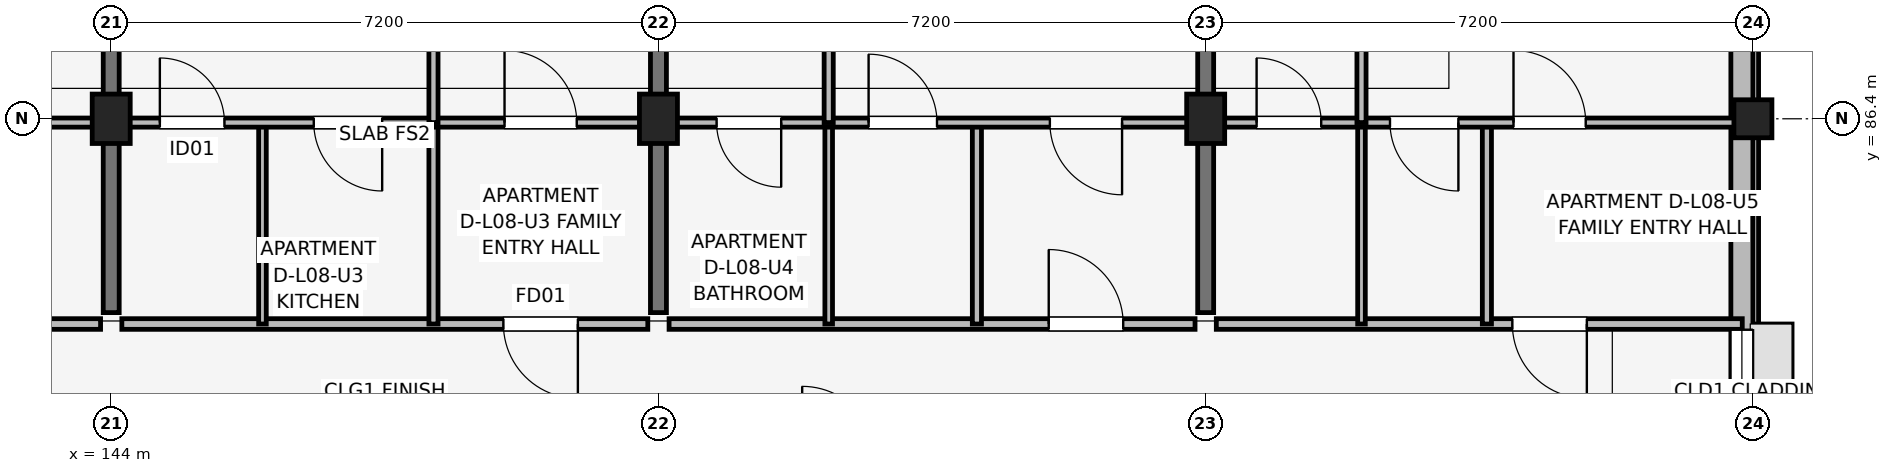
"""IFC4 building model, lengths in metres.
Left out: names, types, materials, properties, quantities, classifications, styles, units other than length and angle.
Written with IfcOpenShell. Run it as: python <this file> out.ifc"""

import sys

from ifc_helpers import new_model, si_unit, direction, frame, frame_2d, origin, origin_2d, place, context, subcontext, project, spatial, rectangle, extrude, element, fill, save


model = new_model("IFC4")
c1 = context("Model", 3, precision=1e-05, world=origin(), true_north=direction((0.0, 1.0)))
c2 = subcontext(c1, "Body", "Model", "MODEL_VIEW")
j1 = project(units=[si_unit("LENGTHUNIT", "METRE"), si_unit("PLANEANGLEUNIT", "RADIAN")], contexts=[c1])
p1 = place(None, origin())
s1 = spatial("IfcSite", under=j1, at=p1, CompositionType="ELEMENT")
p2 = place(p1, origin())
s2 = spatial("IfcBuilding", under=s1, at=p2, CompositionType="ELEMENT")
p3 = place(p2, frame((0.0, 0.0, 27.6)))
s3 = spatial("IfcBuildingStorey", under=s2, at=p3, CompositionType="ELEMENT", Elevation=27.6)
for number, where, z_axis, x_axis in (
    (1, (144.0, 86.4, 0.0), (0.0, 0.0, 1.0), (1.0, 0.0, 0.0)),
    (2, (151.2, 86.4, 0.0), (0.0, 0.0, 1.0), (1.0, 0.0, 0.0)),
    (3, (158.4, 86.4, 0.0), (0.0, 0.0, 1.0), (1.0, 0.0, 0.0)),
):
    element("IfcColumn", number, at=place(p3, frame(where, z_axis=z_axis, x_axis=x_axis)), inside=s3, PredefinedType="COLUMN", context=c2, shape_type="SweptSolid", body=[
        extrude(rectangle(XDim=0.5, YDim=0.65, at=origin_2d()), origin(), (0.0, 0.0, 1.0), 3.15),
    ])
p4 = place(p3, frame((165.6, 86.4, 0.0), z_axis=(0.0, 0.0, 1.0), x_axis=(1.0, 0.0, 0.0)))
e4 = element("IfcColumn", 4, at=p4, inside=s3, PredefinedType="COLUMN", context=c2, shape_type="SweptSolid", body=[
    extrude(rectangle(XDim=0.5, YDim=0.5, at=origin_2d()), origin(), (0.0, 0.0, 1.0), 3.15),
])
for number, where, z_axis, x_axis in (
    (5, (144.0, 83.85, 0.0), (0.0, 0.0, 1.0), (0.0, 1.0, 0.0)),
    (6, (151.2, 83.85, 0.0), (0.0, 0.0, 1.0), (0.0, 1.0, 0.0)),
    (7, (158.4, 83.85, 0.0), (0.0, 0.0, 1.0), (0.0, 1.0, 0.0)),
):
    element("IfcWall", number, at=place(p3, frame(where, z_axis=z_axis, x_axis=x_axis)), inside=s3, PredefinedType="SHEAR", context=c2, shape_type="SweptSolid", body=[
        extrude(rectangle(XDim=9.4, YDim=0.21, at=frame_2d((4.7, 0.0))), origin(), (0.0, 0.0, 1.0), 3.15),
    ])
p5 = place(p3, frame((165.455, 74.8, 0.0), z_axis=(0.0, 0.0, 1.0), x_axis=(0.0, 1.0, 0.0)))
e8 = element("IfcWall", 8, at=p5, inside=s3, PredefinedType="SOLIDWALL", context=c2, shape_type="SweptSolid", body=[
    extrude(rectangle(XDim=16.0, YDim=0.29, at=frame_2d((8.0, 0.0))), origin(), (0.0, 0.0, 1.0), 2.43),
])
p6 = place(p5, frame((7.175, 0.0, 1.05)))
e9 = element("IfcOpeningElement", 9, at=p6, cuts=e8, PredefinedType="OPENING", context=c2, shape_type="SweptSolid", body=[
    extrude(rectangle(XDim=1.65, YDim=1.15, at=frame_2d((0.825, 0.575))), frame((0.0, 0.155, 0.0), z_axis=(0.0, -1.0, 0.0), x_axis=(1.0, 0.0, 0.0)), (0.0, 0.0, 1.0), 0.31),
])
p7 = place(p5, frame((13.13, 0.0, 0.72)))
e10 = element("IfcOpeningElement", 10, at=p7, cuts=e8, PredefinedType="OPENING", context=c2, shape_type="SweptSolid", body=[
    extrude(rectangle(XDim=1.42, YDim=1.6, at=frame_2d((0.71, 0.8))), frame((0.0, 0.155, 0.0), z_axis=(0.0, -1.0, 0.0), x_axis=(1.0, 0.0, 0.0)), (0.0, 0.0, 1.0), 0.31),
])
p8 = place(p3, frame((136.94, 83.7, 0.0), z_axis=(0.0, 0.0, 1.0), x_axis=(1.0, 0.0, 0.0)))
e11 = element("IfcWall", 11, at=p8, inside=s3, PredefinedType="PARTITIONING", context=c2, shape_type="SweptSolid", body=[
    extrude(rectangle(XDim=6.92, YDim=0.14, at=frame_2d((3.46, 0.0))), origin(), (0.0, 0.0, 1.0), 2.38),
])
p9 = place(p8, frame((4.87, 0.0, 0.0)))
e12 = element("IfcOpeningElement", 12, at=p9, cuts=e11, PredefinedType="OPENING", context=c2, shape_type="SweptSolid", body=[
    extrude(rectangle(XDim=0.98, YDim=2.1, at=frame_2d((0.49, 1.05))), frame((0.0, 0.08, 0.0), z_axis=(0.0, -1.0, 0.0), x_axis=(1.0, 0.0, 0.0)), (0.0, 0.0, 1.0), 0.16),
])
p10 = place(p3, frame((136.94, 86.35, 0.0), z_axis=(0.0, 0.0, 1.0), x_axis=(1.0, 0.0, 0.0)))
e13 = element("IfcWall", 13, at=p10, inside=s3, PredefinedType="PARTITIONING", context=c2, shape_type="SweptSolid", body=[
    extrude(rectangle(XDim=6.92, YDim=0.12, at=frame_2d((3.46, 0.0))), origin(), (0.0, 0.0, 1.0), 2.38),
])
p11 = place(p10, frame((1.35, 0.0, 0.0), z_axis=(0.0, 0.0, 1.0), x_axis=(-1.0, 0.0, 0.0)))
e14 = element("IfcOpeningElement", 14, at=p11, cuts=e13, PredefinedType="OPENING", context=c2, shape_type="SweptSolid", body=[
    extrude(rectangle(XDim=0.85, YDim=2.08, at=frame_2d((0.425, 1.04))), frame((0.0, 0.07, 0.0), z_axis=(0.0, -1.0, 0.0), x_axis=(1.0, 0.0, 0.0)), (0.0, 0.0, 1.0), 0.14),
])
p12 = place(p10, frame((2.375, 0.0, 0.0)))
e15 = element("IfcOpeningElement", 15, at=p12, cuts=e13, PredefinedType="OPENING", context=c2, shape_type="SweptSolid", body=[
    extrude(rectangle(XDim=0.9, YDim=2.08, at=frame_2d((0.45, 1.04))), frame((0.0, 0.07, 0.0), z_axis=(0.0, -1.0, 0.0), x_axis=(1.0, 0.0, 0.0)), (0.0, 0.0, 1.0), 0.14),
])
p13 = place(p10, frame((5.835, 0.0, 0.0), z_axis=(0.0, 0.0, 1.0), x_axis=(-1.0, 0.0, 0.0)))
e16 = element("IfcOpeningElement", 16, at=p13, cuts=e13, PredefinedType="OPENING", context=c2, shape_type="SweptSolid", body=[
    extrude(rectangle(XDim=0.95, YDim=2.08, at=frame_2d((0.475, 1.04))), frame((0.0, 0.07, 0.0), z_axis=(0.0, -1.0, 0.0), x_axis=(1.0, 0.0, 0.0)), (0.0, 0.0, 1.0), 0.14),
])
p14 = place(p3, frame((144.14, 83.7, 0.0), z_axis=(0.0, 0.0, 1.0), x_axis=(1.0, 0.0, 0.0)))
e17 = element("IfcWall", 17, at=p14, inside=s3, PredefinedType="PARTITIONING", context=c2, shape_type="SweptSolid", body=[
    extrude(rectangle(XDim=6.92, YDim=0.14, at=frame_2d((3.46, 0.0))), origin(), (0.0, 0.0, 1.0), 2.38),
])
p15 = place(p14, frame((6.0, 0.0, 0.0), z_axis=(0.0, 0.0, 1.0), x_axis=(-1.0, 0.0, 0.0)))
e18 = element("IfcOpeningElement", 18, at=p15, cuts=e17, PredefinedType="OPENING", context=c2, shape_type="SweptSolid", body=[
    extrude(rectangle(XDim=0.98, YDim=2.1, at=frame_2d((0.49, 1.05))), frame((0.0, 0.08, 0.0), z_axis=(0.0, -1.0, 0.0), x_axis=(1.0, 0.0, 0.0)), (0.0, 0.0, 1.0), 0.16),
])
p16 = place(p3, frame((145.99, 83.7, 0.0), z_axis=(0.0, 0.0, 1.0), x_axis=(0.0, 1.0, 0.0)))
e19 = element("IfcWall", 19, at=p16, inside=s3, PredefinedType="PARTITIONING", context=c2, shape_type="SweptSolid", body=[
    extrude(rectangle(XDim=2.65, YDim=0.1, at=frame_2d((1.325, 0.0))), origin(), (0.0, 0.0, 1.0), 2.38),
])
p17 = place(p3, frame((148.24, 83.7, 0.0), z_axis=(0.0, 0.0, 1.0), x_axis=(0.0, 1.0, 0.0)))
e20 = element("IfcWall", 20, at=p17, inside=s3, PredefinedType="PARTITIONING", context=c2, shape_type="SweptSolid", body=[
    extrude(rectangle(XDim=2.65, YDim=0.12, at=frame_2d((1.325, 0.0))), origin(), (0.0, 0.0, 1.0), 2.38),
])
p18 = place(p3, frame((144.14, 86.35, 0.0), z_axis=(0.0, 0.0, 1.0), x_axis=(1.0, 0.0, 0.0)))
e21 = element("IfcWall", 21, at=p18, inside=s3, PredefinedType="PARTITIONING", context=c2, shape_type="SweptSolid", body=[
    extrude(rectangle(XDim=6.92, YDim=0.12, at=frame_2d((3.46, 0.0))), origin(), (0.0, 0.0, 1.0), 2.38),
])
p19 = place(p18, frame((0.5, 0.0, 0.0)))
e22 = element("IfcOpeningElement", 22, at=p19, cuts=e21, PredefinedType="OPENING", context=c2, shape_type="SweptSolid", body=[
    extrude(rectangle(XDim=0.85, YDim=2.08, at=frame_2d((0.425, 1.04))), frame((0.0, 0.07, 0.0), z_axis=(0.0, -1.0, 0.0), x_axis=(1.0, 0.0, 0.0)), (0.0, 0.0, 1.0), 0.14),
])
p20 = place(p18, frame((3.425, 0.0, 0.0), z_axis=(0.0, 0.0, 1.0), x_axis=(-1.0, 0.0, 0.0)))
e23 = element("IfcOpeningElement", 23, at=p20, cuts=e21, PredefinedType="OPENING", context=c2, shape_type="SweptSolid", body=[
    extrude(rectangle(XDim=0.9, YDim=2.08, at=frame_2d((0.45, 1.04))), frame((0.0, 0.07, 0.0), z_axis=(0.0, -1.0, 0.0), x_axis=(1.0, 0.0, 0.0)), (0.0, 0.0, 1.0), 0.14),
])
p21 = place(p18, frame((5.035, 0.0, 0.0)))
e24 = element("IfcOpeningElement", 24, at=p21, cuts=e21, PredefinedType="OPENING", context=c2, shape_type="SweptSolid", body=[
    extrude(rectangle(XDim=0.95, YDim=2.08, at=frame_2d((0.475, 1.04))), frame((0.0, 0.07, 0.0), z_axis=(0.0, -1.0, 0.0), x_axis=(1.0, 0.0, 0.0)), (0.0, 0.0, 1.0), 0.14),
])
p22 = place(p3, frame((148.24, 86.35, 0.0), z_axis=(0.0, 0.0, 1.0), x_axis=(0.0, 1.0, 0.0)))
e25 = element("IfcWall", 25, at=p22, inside=s3, PredefinedType="PARTITIONING", context=c2, shape_type="SweptSolid", body=[
    extrude(rectangle(XDim=6.95, YDim=0.12, at=frame_2d((3.475, 0.0))), origin(), (0.0, 0.0, 1.0), 2.38),
])
p23 = place(p22, frame((3.925, 0.0, 0.0), z_axis=(0.0, 0.0, 1.0), x_axis=(-1.0, 0.0, 0.0)))
e26 = element("IfcOpeningElement", 26, at=p23, cuts=e25, PredefinedType="OPENING", context=c2, shape_type="SweptSolid", body=[
    extrude(rectangle(XDim=0.9, YDim=2.08, at=frame_2d((0.45, 1.04))), frame((0.0, 0.07, 0.0), z_axis=(0.0, -1.0, 0.0), x_axis=(1.0, 0.0, 0.0)), (0.0, 0.0, 1.0), 0.14),
])
p24 = place(p3, frame((151.34, 83.7, 0.0), z_axis=(0.0, 0.0, 1.0), x_axis=(1.0, 0.0, 0.0)))
e27 = element("IfcWall", 27, at=p24, inside=s3, PredefinedType="PARTITIONING", context=c2, shape_type="SweptSolid", body=[
    extrude(rectangle(XDim=6.92, YDim=0.14, at=frame_2d((3.46, 0.0))), origin(), (0.0, 0.0, 1.0), 2.38),
])
p25 = place(p24, frame((4.995, 0.0, 0.0)))
e28 = element("IfcOpeningElement", 28, at=p25, cuts=e27, PredefinedType="OPENING", context=c2, shape_type="SweptSolid", body=[
    extrude(rectangle(XDim=0.98, YDim=2.1, at=frame_2d((0.49, 1.05))), frame((0.0, 0.08, 0.0), z_axis=(0.0, -1.0, 0.0), x_axis=(1.0, 0.0, 0.0)), (0.0, 0.0, 1.0), 0.16),
])
p26 = place(p3, frame((153.44, 83.7, 0.0), z_axis=(0.0, 0.0, 1.0), x_axis=(0.0, 1.0, 0.0)))
e29 = element("IfcWall", 29, at=p26, inside=s3, PredefinedType="PARTITIONING", context=c2, shape_type="SweptSolid", body=[
    extrude(rectangle(XDim=2.65, YDim=0.1, at=frame_2d((1.325, 0.0))), origin(), (0.0, 0.0, 1.0), 2.38),
])
p27 = place(p3, frame((155.39, 83.7, 0.0), z_axis=(0.0, 0.0, 1.0), x_axis=(0.0, 1.0, 0.0)))
e30 = element("IfcWall", 30, at=p27, inside=s3, PredefinedType="PARTITIONING", context=c2, shape_type="SweptSolid", body=[
    extrude(rectangle(XDim=2.65, YDim=0.12, at=frame_2d((1.325, 0.0))), origin(), (0.0, 0.0, 1.0), 2.38),
])
p28 = place(p3, frame((151.34, 86.35, 0.0), z_axis=(0.0, 0.0, 1.0), x_axis=(1.0, 0.0, 0.0)))
e31 = element("IfcWall", 31, at=p28, inside=s3, PredefinedType="PARTITIONING", context=c2, shape_type="SweptSolid", body=[
    extrude(rectangle(XDim=6.92, YDim=0.12, at=frame_2d((3.46, 0.0))), origin(), (0.0, 0.0, 1.0), 2.38),
])
p29 = place(p28, frame((1.475, 0.0, 0.0), z_axis=(0.0, 0.0, 1.0), x_axis=(-1.0, 0.0, 0.0)))
e32 = element("IfcOpeningElement", 32, at=p29, cuts=e31, PredefinedType="OPENING", context=c2, shape_type="SweptSolid", body=[
    extrude(rectangle(XDim=0.85, YDim=2.08, at=frame_2d((0.425, 1.04))), frame((0.0, 0.07, 0.0), z_axis=(0.0, -1.0, 0.0), x_axis=(1.0, 0.0, 0.0)), (0.0, 0.0, 1.0), 0.14),
])
p30 = place(p28, frame((2.625, 0.0, 0.0)))
e33 = element("IfcOpeningElement", 33, at=p30, cuts=e31, PredefinedType="OPENING", context=c2, shape_type="SweptSolid", body=[
    extrude(rectangle(XDim=0.9, YDim=2.08, at=frame_2d((0.45, 1.04))), frame((0.0, 0.07, 0.0), z_axis=(0.0, -1.0, 0.0), x_axis=(1.0, 0.0, 0.0)), (0.0, 0.0, 1.0), 0.14),
])
p31 = place(p28, frame((5.96, 0.0, 0.0), z_axis=(0.0, 0.0, 1.0), x_axis=(-1.0, 0.0, 0.0)))
e34 = element("IfcOpeningElement", 34, at=p31, cuts=e31, PredefinedType="OPENING", context=c2, shape_type="SweptSolid", body=[
    extrude(rectangle(XDim=0.95, YDim=2.08, at=frame_2d((0.475, 1.04))), frame((0.0, 0.07, 0.0), z_axis=(0.0, -1.0, 0.0), x_axis=(1.0, 0.0, 0.0)), (0.0, 0.0, 1.0), 0.14),
])
p32 = place(p3, frame((153.44, 86.35, 0.0), z_axis=(0.0, 0.0, 1.0), x_axis=(0.0, 1.0, 0.0)))
e35 = element("IfcWall", 35, at=p32, inside=s3, PredefinedType="PARTITIONING", context=c2, shape_type="SweptSolid", body=[
    extrude(rectangle(XDim=6.95, YDim=0.12, at=frame_2d((3.475, 0.0))), origin(), (0.0, 0.0, 1.0), 2.38),
])
p33 = place(p32, frame((3.025, 0.0, 0.0)))
e36 = element("IfcOpeningElement", 36, at=p33, cuts=e35, PredefinedType="OPENING", context=c2, shape_type="SweptSolid", body=[
    extrude(rectangle(XDim=0.9, YDim=2.08, at=frame_2d((0.45, 1.04))), frame((0.0, 0.07, 0.0), z_axis=(0.0, -1.0, 0.0), x_axis=(1.0, 0.0, 0.0)), (0.0, 0.0, 1.0), 0.14),
])
p34 = place(p3, frame((158.54, 83.7, 0.0), z_axis=(0.0, 0.0, 1.0), x_axis=(1.0, 0.0, 0.0)))
e37 = element("IfcWall", 37, at=p34, inside=s3, PredefinedType="PARTITIONING", context=c2, shape_type="SweptSolid", body=[
    extrude(rectangle(XDim=6.92, YDim=0.14, at=frame_2d((3.46, 0.0))), origin(), (0.0, 0.0, 1.0), 2.38),
])
p35 = place(p34, frame((4.875, 0.0, 0.0), z_axis=(0.0, 0.0, 1.0), x_axis=(-1.0, 0.0, 0.0)))
e38 = element("IfcOpeningElement", 38, at=p35, cuts=e37, PredefinedType="OPENING", context=c2, shape_type="SweptSolid", body=[
    extrude(rectangle(XDim=0.98, YDim=2.1, at=frame_2d((0.49, 1.05))), frame((0.0, 0.08, 0.0), z_axis=(0.0, -1.0, 0.0), x_axis=(1.0, 0.0, 0.0)), (0.0, 0.0, 1.0), 0.16),
])
p36 = place(p3, frame((160.45, 83.7, 0.0), z_axis=(0.0, 0.0, 1.0), x_axis=(0.0, 1.0, 0.0)))
e39 = element("IfcWall", 39, at=p36, inside=s3, PredefinedType="PARTITIONING", context=c2, shape_type="SweptSolid", body=[
    extrude(rectangle(XDim=2.65, YDim=0.1, at=frame_2d((1.325, 0.0))), origin(), (0.0, 0.0, 1.0), 2.38),
])
p37 = place(p3, frame((162.1, 83.7, 0.0), z_axis=(0.0, 0.0, 1.0), x_axis=(0.0, 1.0, 0.0)))
e40 = element("IfcWall", 40, at=p37, inside=s3, PredefinedType="PARTITIONING", context=c2, shape_type="SweptSolid", body=[
    extrude(rectangle(XDim=2.65, YDim=0.12, at=frame_2d((1.325, 0.0))), origin(), (0.0, 0.0, 1.0), 2.38),
])
p38 = place(p3, frame((158.54, 86.35, 0.0), z_axis=(0.0, 0.0, 1.0), x_axis=(1.0, 0.0, 0.0)))
e41 = element("IfcWall", 41, at=p38, inside=s3, PredefinedType="PARTITIONING", context=c2, shape_type="SweptSolid", body=[
    extrude(rectangle(XDim=6.92, YDim=0.12, at=frame_2d((3.46, 0.0))), origin(), (0.0, 0.0, 1.0), 2.38),
])
p39 = place(p38, frame((0.53, 0.0, 0.0)))
e42 = element("IfcOpeningElement", 42, at=p39, cuts=e41, PredefinedType="OPENING", context=c2, shape_type="SweptSolid", body=[
    extrude(rectangle(XDim=0.85, YDim=2.08, at=frame_2d((0.425, 1.04))), frame((0.0, 0.07, 0.0), z_axis=(0.0, -1.0, 0.0), x_axis=(1.0, 0.0, 0.0)), (0.0, 0.0, 1.0), 0.14),
])
p40 = place(p38, frame((3.185, 0.0, 0.0), z_axis=(0.0, 0.0, 1.0), x_axis=(-1.0, 0.0, 0.0)))
e43 = element("IfcOpeningElement", 43, at=p40, cuts=e41, PredefinedType="OPENING", context=c2, shape_type="SweptSolid", body=[
    extrude(rectangle(XDim=0.9, YDim=2.08, at=frame_2d((0.45, 1.04))), frame((0.0, 0.07, 0.0), z_axis=(0.0, -1.0, 0.0), x_axis=(1.0, 0.0, 0.0)), (0.0, 0.0, 1.0), 0.14),
])
p41 = place(p38, frame((3.91, 0.0, 0.0)))
e44 = element("IfcOpeningElement", 44, at=p41, cuts=e41, PredefinedType="OPENING", context=c2, shape_type="SweptSolid", body=[
    extrude(rectangle(XDim=0.95, YDim=2.08, at=frame_2d((0.475, 1.04))), frame((0.0, 0.07, 0.0), z_axis=(0.0, -1.0, 0.0), x_axis=(1.0, 0.0, 0.0)), (0.0, 0.0, 1.0), 0.14),
])
p42 = place(p3, frame((160.45, 86.35, 0.0), z_axis=(0.0, 0.0, 1.0), x_axis=(0.0, 1.0, 0.0)))
e45 = element("IfcWall", 45, at=p42, inside=s3, PredefinedType="PARTITIONING", context=c2, shape_type="SweptSolid", body=[
    extrude(rectangle(XDim=6.95, YDim=0.12, at=frame_2d((3.475, 0.0))), origin(), (0.0, 0.0, 1.0), 2.38),
])
p43 = place(p42, frame((3.925, 0.0, 0.0), z_axis=(0.0, 0.0, 1.0), x_axis=(-1.0, 0.0, 0.0)))
e46 = element("IfcOpeningElement", 46, at=p43, cuts=e45, PredefinedType="OPENING", context=c2, shape_type="SweptSolid", body=[
    extrude(rectangle(XDim=0.9, YDim=2.08, at=frame_2d((0.45, 1.04))), frame((0.0, 0.07, 0.0), z_axis=(0.0, -1.0, 0.0), x_axis=(1.0, 0.0, 0.0)), (0.0, 0.0, 1.0), 0.14),
])
p44 = place(p6, origin())
e47 = element("IfcWindow", 47, at=p44, inside=s3, PartitioningType="SINGLE_PANEL", PredefinedType="WINDOW", context=c2, shape_type="SweptSolid", body=[
    extrude(rectangle(XDim=1.65, YDim=1.15, at=frame_2d((0.825, 0.575))), frame((0.0, 0.03, 0.0), z_axis=(0.0, -1.0, 0.0), x_axis=(1.0, 0.0, 0.0)), (0.0, 0.0, 1.0), 0.06),
])
fill(e9, e47)
p45 = place(p15, origin())
e48 = element("IfcDoor", 48, at=p45, inside=s3, OperationType="SINGLE_SWING_RIGHT", PredefinedType="DOOR", context=c2, shape_type="SweptSolid", body=[
    extrude(rectangle(XDim=0.98, YDim=2.1, at=frame_2d((0.49, 1.05))), frame((0.0, 0.025, 0.0), z_axis=(0.0, -1.0, 0.0), x_axis=(1.0, 0.0, 0.0)), (0.0, 0.0, 1.0), 0.05),
])
fill(e18, e48)
p46 = place(p19, origin())
e49 = element("IfcDoor", 49, at=p46, inside=s3, OperationType="SINGLE_SWING_LEFT", PredefinedType="DOOR", context=c2, shape_type="SweptSolid", body=[
    extrude(rectangle(XDim=0.85, YDim=2.08, at=frame_2d((0.425, 1.04))), frame((0.0, 0.025, 0.0), z_axis=(0.0, -1.0, 0.0), x_axis=(1.0, 0.0, 0.0)), (0.0, 0.0, 1.0), 0.05),
])
fill(e22, e49)
p47 = place(p20, origin())
e50 = element("IfcDoor", 50, at=p47, inside=s3, OperationType="SINGLE_SWING_RIGHT", PredefinedType="DOOR", context=c2, shape_type="SweptSolid", body=[
    extrude(rectangle(XDim=0.9, YDim=2.08, at=frame_2d((0.45, 1.04))), frame((0.0, 0.025, 0.0), z_axis=(0.0, -1.0, 0.0), x_axis=(1.0, 0.0, 0.0)), (0.0, 0.0, 1.0), 0.05),
])
fill(e23, e50)
p48 = place(p21, origin())
e51 = element("IfcDoor", 51, at=p48, inside=s3, OperationType="SINGLE_SWING_LEFT", PredefinedType="DOOR", context=c2, shape_type="SweptSolid", body=[
    extrude(rectangle(XDim=0.95, YDim=2.08, at=frame_2d((0.475, 1.04))), frame((0.0, 0.025, 0.0), z_axis=(0.0, -1.0, 0.0), x_axis=(1.0, 0.0, 0.0)), (0.0, 0.0, 1.0), 0.05),
])
fill(e24, e51)
p49 = place(p25, origin())
e52 = element("IfcDoor", 52, at=p49, inside=s3, OperationType="SINGLE_SWING_LEFT", PredefinedType="DOOR", context=c2, shape_type="SweptSolid", body=[
    extrude(rectangle(XDim=0.98, YDim=2.1, at=frame_2d((0.49, 1.05))), frame((0.0, 0.025, 0.0), z_axis=(0.0, -1.0, 0.0), x_axis=(1.0, 0.0, 0.0)), (0.0, 0.0, 1.0), 0.05),
])
fill(e28, e52)
p50 = place(p29, origin())
e53 = element("IfcDoor", 53, at=p50, inside=s3, OperationType="SINGLE_SWING_RIGHT", PredefinedType="DOOR", context=c2, shape_type="SweptSolid", body=[
    extrude(rectangle(XDim=0.85, YDim=2.08, at=frame_2d((0.425, 1.04))), frame((0.0, 0.025, 0.0), z_axis=(0.0, -1.0, 0.0), x_axis=(1.0, 0.0, 0.0)), (0.0, 0.0, 1.0), 0.05),
])
fill(e32, e53)
p51 = place(p30, origin())
e54 = element("IfcDoor", 54, at=p51, inside=s3, OperationType="SINGLE_SWING_LEFT", PredefinedType="DOOR", context=c2, shape_type="SweptSolid", body=[
    extrude(rectangle(XDim=0.9, YDim=2.08, at=frame_2d((0.45, 1.04))), frame((0.0, 0.025, 0.0), z_axis=(0.0, -1.0, 0.0), x_axis=(1.0, 0.0, 0.0)), (0.0, 0.0, 1.0), 0.05),
])
fill(e33, e54)
p52 = place(p31, origin())
e55 = element("IfcDoor", 55, at=p52, inside=s3, OperationType="SINGLE_SWING_RIGHT", PredefinedType="DOOR", context=c2, shape_type="SweptSolid", body=[
    extrude(rectangle(XDim=0.95, YDim=2.08, at=frame_2d((0.475, 1.04))), frame((0.0, 0.025, 0.0), z_axis=(0.0, -1.0, 0.0), x_axis=(1.0, 0.0, 0.0)), (0.0, 0.0, 1.0), 0.05),
])
fill(e34, e55)
p53 = place(p35, origin())
e56 = element("IfcDoor", 56, at=p53, inside=s3, OperationType="SINGLE_SWING_RIGHT", PredefinedType="DOOR", context=c2, shape_type="SweptSolid", body=[
    extrude(rectangle(XDim=0.98, YDim=2.1, at=frame_2d((0.49, 1.05))), frame((0.0, 0.025, 0.0), z_axis=(0.0, -1.0, 0.0), x_axis=(1.0, 0.0, 0.0)), (0.0, 0.0, 1.0), 0.05),
])
fill(e38, e56)
p54 = place(p39, origin())
e57 = element("IfcDoor", 57, at=p54, inside=s3, OperationType="SINGLE_SWING_LEFT", PredefinedType="DOOR", context=c2, shape_type="SweptSolid", body=[
    extrude(rectangle(XDim=0.85, YDim=2.08, at=frame_2d((0.425, 1.04))), frame((0.0, 0.025, 0.0), z_axis=(0.0, -1.0, 0.0), x_axis=(1.0, 0.0, 0.0)), (0.0, 0.0, 1.0), 0.05),
])
fill(e42, e57)
p55 = place(p40, origin())
e58 = element("IfcDoor", 58, at=p55, inside=s3, OperationType="SINGLE_SWING_RIGHT", PredefinedType="DOOR", context=c2, shape_type="SweptSolid", body=[
    extrude(rectangle(XDim=0.9, YDim=2.08, at=frame_2d((0.45, 1.04))), frame((0.0, 0.025, 0.0), z_axis=(0.0, -1.0, 0.0), x_axis=(1.0, 0.0, 0.0)), (0.0, 0.0, 1.0), 0.05),
])
fill(e43, e58)
p56 = place(p41, origin())
e59 = element("IfcDoor", 59, at=p56, inside=s3, OperationType="SINGLE_SWING_LEFT", PredefinedType="DOOR", context=c2, shape_type="SweptSolid", body=[
    extrude(rectangle(XDim=0.95, YDim=2.08, at=frame_2d((0.475, 1.04))), frame((0.0, 0.025, 0.0), z_axis=(0.0, -1.0, 0.0), x_axis=(1.0, 0.0, 0.0)), (0.0, 0.0, 1.0), 0.05),
])
fill(e44, e59)
save(model, sys.argv[1])
